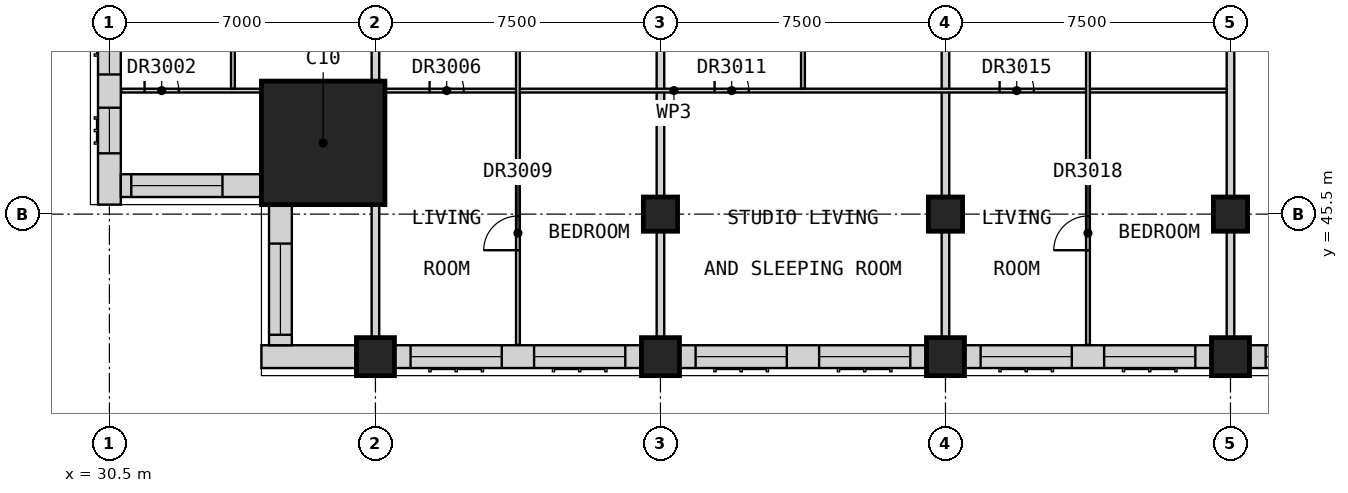
"""IFC4 building model, lengths in metres.
Left out: names, types, materials, properties, quantities, classifications, styles, units other than length and angle.
Written with IfcOpenShell. Run it as: python <this file> out.ifc"""

import sys

from ifc_helpers import new_model, si_unit, direction, frame, frame_2d, origin, origin_2d, place, context, subcontext, project, spatial, rectangle, extrude, element, fill, save


model = new_model("IFC4")
c1 = context("Model", 3, precision=1e-05, world=origin(), true_north=direction((0.0, 1.0)))
c2 = subcontext(c1, "Body", "Model", "MODEL_VIEW")
j1 = project(units=[si_unit("LENGTHUNIT", "METRE"), si_unit("PLANEANGLEUNIT", "RADIAN")], contexts=[c1])
p1 = place(None, origin())
s1 = spatial("IfcSite", under=j1, at=p1, CompositionType="ELEMENT")
p2 = place(p1, origin())
s2 = spatial("IfcBuilding", under=s1, at=p2, CompositionType="ELEMENT")
p3 = place(p2, frame((0.0, 0.0, 186.2)))
s3 = spatial("IfcBuildingStorey", under=s2, at=p3, CompositionType="ELEMENT", Elevation=186.2)
for number, where, z_axis, x_axis in (
    (1, (37.5, 41.75, 0.0), (0.0, 0.0, 1.0), (1.0, 0.0, 0.0)),
    (2, (45.0, 41.75, 0.0), (0.0, 0.0, 1.0), (1.0, 0.0, 0.0)),
    (3, (52.5, 41.75, 0.0), (0.0, 0.0, 1.0), (1.0, 0.0, 0.0)),
    (4, (60.0, 41.75, 0.0), (0.0, 0.0, 1.0), (1.0, 0.0, 0.0)),
):
    element("IfcColumn", number, at=place(p3, frame(where, z_axis=z_axis, x_axis=x_axis)), inside=s3, PredefinedType="COLUMN", context=c2, shape_type="SweptSolid", body=[
        extrude(rectangle(XDim=1.0, YDim=1.0, at=origin_2d()), origin(), (0.0, 0.0, 1.0), 3.5),
    ])
for number, where, z_axis, x_axis in (
    (5, (45.0, 45.5, 0.0), (0.0, 0.0, 1.0), (1.0, 0.0, 0.0)),
    (6, (52.5, 45.5, 0.0), (0.0, 0.0, 1.0), (1.0, 0.0, 0.0)),
    (7, (60.0, 45.5, 0.0), (0.0, 0.0, 1.0), (1.0, 0.0, 0.0)),
):
    element("IfcColumn", number, at=place(p3, frame(where, z_axis=z_axis, x_axis=x_axis)), inside=s3, PredefinedType="COLUMN", context=c2, shape_type="SweptSolid", body=[
        extrude(rectangle(XDim=0.9, YDim=0.9, at=origin_2d()), origin(), (0.0, 0.0, 1.0), 3.5),
    ])
p4 = place(p3, frame((36.125, 47.375, 0.0), z_axis=(0.0, 0.0, 1.0), x_axis=(1.0, 0.0, 0.0)))
e8 = element("IfcColumn", 8, at=p4, inside=s3, PredefinedType="COLUMN", context=c2, shape_type="SweptSolid", body=[
    extrude(rectangle(XDim=3.25, YDim=3.25, at=origin_2d()), origin(), (0.0, 0.0, 1.0), 3.5),
])
p5 = place(p3, frame((34.5, 41.75, 0.0), z_axis=(0.0, 0.0, 1.0), x_axis=(1.0, 0.0, 0.0)))
e9 = element("IfcWall", 9, at=p5, inside=s3, PredefinedType="SOLIDWALL", context=c2, shape_type="SweptSolid", body=[
    extrude(rectangle(XDim=2.5, YDim=0.6, at=frame_2d((1.25, 0.0))), origin(), (0.0, 0.0, 1.0), 3.25),
])
p6 = place(p3, frame((38.0, 41.75, 0.0), z_axis=(0.0, 0.0, 1.0), x_axis=(1.0, 0.0, 0.0)))
e10 = element("IfcWall", 10, at=p6, inside=s3, PredefinedType="SOLIDWALL", context=c2, shape_type="SweptSolid", body=[
    extrude(rectangle(XDim=6.5, YDim=0.6, at=frame_2d((3.25, 0.0))), origin(), (0.0, 0.0, 1.0), 2.75),
])
p7 = place(p6, frame((0.425, 0.0, 0.8)))
e11 = element("IfcOpeningElement", 11, at=p7, cuts=e10, PredefinedType="OPENING", context=c2, shape_type="SweptSolid", body=[
    extrude(rectangle(XDim=2.4, YDim=1.8, at=frame_2d((1.2, 0.9))), frame((0.0, 0.31, 0.0), z_axis=(0.0, -1.0, 0.0), x_axis=(1.0, 0.0, 0.0)), (0.0, 0.0, 1.0), 0.62),
])
p8 = place(p6, frame((3.675, 0.0, 0.8)))
e12 = element("IfcOpeningElement", 12, at=p8, cuts=e10, PredefinedType="OPENING", context=c2, shape_type="SweptSolid", body=[
    extrude(rectangle(XDim=2.4, YDim=1.8, at=frame_2d((1.2, 0.9))), frame((0.0, 0.31, 0.0), z_axis=(0.0, -1.0, 0.0), x_axis=(1.0, 0.0, 0.0)), (0.0, 0.0, 1.0), 0.62),
])
p9 = place(p3, frame((45.5, 41.75, 0.0), z_axis=(0.0, 0.0, 1.0), x_axis=(1.0, 0.0, 0.0)))
e13 = element("IfcWall", 13, at=p9, inside=s3, PredefinedType="SOLIDWALL", context=c2, shape_type="SweptSolid", body=[
    extrude(rectangle(XDim=6.5, YDim=0.6, at=frame_2d((3.25, 0.0))), origin(), (0.0, 0.0, 1.0), 2.75),
])
p10 = place(p9, frame((0.425, 0.0, 0.8)))
e14 = element("IfcOpeningElement", 14, at=p10, cuts=e13, PredefinedType="OPENING", context=c2, shape_type="SweptSolid", body=[
    extrude(rectangle(XDim=2.4, YDim=1.8, at=frame_2d((1.2, 0.9))), frame((0.0, 0.31, 0.0), z_axis=(0.0, -1.0, 0.0), x_axis=(1.0, 0.0, 0.0)), (0.0, 0.0, 1.0), 0.62),
])
p11 = place(p9, frame((3.675, 0.0, 0.8)))
e15 = element("IfcOpeningElement", 15, at=p11, cuts=e13, PredefinedType="OPENING", context=c2, shape_type="SweptSolid", body=[
    extrude(rectangle(XDim=2.4, YDim=1.8, at=frame_2d((1.2, 0.9))), frame((0.0, 0.31, 0.0), z_axis=(0.0, -1.0, 0.0), x_axis=(1.0, 0.0, 0.0)), (0.0, 0.0, 1.0), 0.62),
])
p12 = place(p3, frame((53.0, 41.75, 0.0), z_axis=(0.0, 0.0, 1.0), x_axis=(1.0, 0.0, 0.0)))
e16 = element("IfcWall", 16, at=p12, inside=s3, PredefinedType="SOLIDWALL", context=c2, shape_type="SweptSolid", body=[
    extrude(rectangle(XDim=6.5, YDim=0.6, at=frame_2d((3.25, 0.0))), origin(), (0.0, 0.0, 1.0), 2.75),
])
p13 = place(p12, frame((0.425, 0.0, 0.8)))
e17 = element("IfcOpeningElement", 17, at=p13, cuts=e16, PredefinedType="OPENING", context=c2, shape_type="SweptSolid", body=[
    extrude(rectangle(XDim=2.4, YDim=1.8, at=frame_2d((1.2, 0.9))), frame((0.0, 0.31, 0.0), z_axis=(0.0, -1.0, 0.0), x_axis=(1.0, 0.0, 0.0)), (0.0, 0.0, 1.0), 0.62),
])
p14 = place(p12, frame((3.675, 0.0, 0.8)))
e18 = element("IfcOpeningElement", 18, at=p14, cuts=e16, PredefinedType="OPENING", context=c2, shape_type="SweptSolid", body=[
    extrude(rectangle(XDim=2.4, YDim=1.8, at=frame_2d((1.2, 0.9))), frame((0.0, 0.31, 0.0), z_axis=(0.0, -1.0, 0.0), x_axis=(1.0, 0.0, 0.0)), (0.0, 0.0, 1.0), 0.62),
])
p15 = place(p3, frame((60.5, 41.75, 0.0), z_axis=(0.0, 0.0, 1.0), x_axis=(1.0, 0.0, 0.0)))
e19 = element("IfcWall", 19, at=p15, inside=s3, PredefinedType="SOLIDWALL", context=c2, shape_type="SweptSolid", body=[
    extrude(rectangle(XDim=6.5, YDim=0.6, at=frame_2d((3.25, 0.0))), origin(), (0.0, 0.0, 1.0), 2.75),
])
p16 = place(p15, frame((0.425, 0.0, 0.8)))
e20 = element("IfcOpeningElement", 20, at=p16, cuts=e19, PredefinedType="OPENING", context=c2, shape_type="SweptSolid", body=[
    extrude(rectangle(XDim=2.4, YDim=1.8, at=frame_2d((1.2, 0.9))), frame((0.0, 0.31, 0.0), z_axis=(0.0, -1.0, 0.0), x_axis=(1.0, 0.0, 0.0)), (0.0, 0.0, 1.0), 0.62),
])
p17 = place(p15, frame((3.675, 0.0, 0.8)))
e21 = element("IfcOpeningElement", 21, at=p17, cuts=e19, PredefinedType="OPENING", context=c2, shape_type="SweptSolid", body=[
    extrude(rectangle(XDim=2.4, YDim=1.8, at=frame_2d((1.2, 0.9))), frame((0.0, 0.31, 0.0), z_axis=(0.0, -1.0, 0.0), x_axis=(1.0, 0.0, 0.0)), (0.0, 0.0, 1.0), 0.62),
])
p18 = place(p3, frame((30.5, 52.0, 0.0), z_axis=(0.0, 0.0, 1.0), x_axis=(0.0, -1.0, 0.0)))
e22 = element("IfcWall", 22, at=p18, inside=s3, PredefinedType="SOLIDWALL", context=c2, shape_type="SweptSolid", body=[
    extrude(rectangle(XDim=6.25, YDim=0.6, at=frame_2d((3.125, 0.0))), origin(), (0.0, 0.0, 1.0), 2.75),
])
p19 = place(p18, frame((3.7, 0.0, 0.8)))
e23 = element("IfcOpeningElement", 23, at=p19, cuts=e22, PredefinedType="OPENING", context=c2, shape_type="SweptSolid", body=[
    extrude(rectangle(XDim=1.2, YDim=1.8, at=frame_2d((0.6, 0.9))), frame((0.0, 0.31, 0.0), z_axis=(0.0, -1.0, 0.0), x_axis=(1.0, 0.0, 0.0)), (0.0, 0.0, 1.0), 0.62),
])
p20 = place(p18, frame((0.425, 0.0, 0.8)))
e24 = element("IfcOpeningElement", 24, at=p20, cuts=e22, PredefinedType="OPENING", context=c2, shape_type="SweptSolid", body=[
    extrude(rectangle(XDim=2.4, YDim=1.8, at=frame_2d((1.2, 0.9))), frame((0.0, 0.31, 0.0), z_axis=(0.0, -1.0, 0.0), x_axis=(1.0, 0.0, 0.0)), (0.0, 0.0, 1.0), 0.62),
])
p21 = place(p3, frame((30.8, 46.25, 0.0), z_axis=(0.0, 0.0, 1.0), x_axis=(1.0, 0.0, 0.0)))
e25 = element("IfcWall", 25, at=p21, inside=s3, PredefinedType="SOLIDWALL", context=c2, shape_type="SweptSolid", body=[
    extrude(rectangle(XDim=3.7, YDim=0.6, at=frame_2d((1.85, 0.0))), origin(), (0.0, 0.0, 1.0), 3.25),
])
p22 = place(p21, frame((0.275, 0.0, 0.8)))
e26 = element("IfcOpeningElement", 26, at=p22, cuts=e25, PredefinedType="OPENING", context=c2, shape_type="SweptSolid", body=[
    extrude(rectangle(XDim=2.4, YDim=1.8, at=frame_2d((1.2, 0.9))), frame((0.0, 0.31, 0.0), z_axis=(0.0, -1.0, 0.0), x_axis=(1.0, 0.0, 0.0)), (0.0, 0.0, 1.0), 0.62),
])
p23 = place(p3, frame((35.0, 45.75, 0.0), z_axis=(0.0, 0.0, 1.0), x_axis=(0.0, -1.0, 0.0)))
e27 = element("IfcWall", 27, at=p23, inside=s3, PredefinedType="SOLIDWALL", context=c2, shape_type="SweptSolid", body=[
    extrude(rectangle(XDim=3.7, YDim=0.6, at=frame_2d((1.85, 0.0))), origin(), (0.0, 0.0, 1.0), 3.25),
])
p24 = place(p23, frame((1.025, 0.0, 0.8)))
e28 = element("IfcOpeningElement", 28, at=p24, cuts=e27, PredefinedType="OPENING", context=c2, shape_type="SweptSolid", body=[
    extrude(rectangle(XDim=2.4, YDim=1.8, at=frame_2d((1.2, 0.9))), frame((0.0, 0.31, 0.0), z_axis=(0.0, -1.0, 0.0), x_axis=(1.0, 0.0, 0.0)), (0.0, 0.0, 1.0), 0.62),
])
p25 = place(p3, frame((37.5, 41.25, 0.0), z_axis=(0.0, 0.0, 1.0), x_axis=(0.0, 1.0, 0.0)))
e29 = element("IfcWall", 29, at=p25, inside=s3, PredefinedType="PARTITIONING", context=c2, shape_type="SweptSolid", body=[
    extrude(rectangle(XDim=16.575, YDim=0.2, at=frame_2d((8.288, 0.0))), origin(), (0.0, 0.0, 1.0), 2.75),
])
for number, where, z_axis, x_axis in (
    (30, (45.0, 41.25, 0.0), (0.0, 0.0, 1.0), (0.0, 1.0, 0.0)),
    (31, (52.5, 41.25, 0.0), (0.0, 0.0, 1.0), (0.0, 1.0, 0.0)),
    (32, (60.0, 41.25, 0.0), (0.0, 0.0, 1.0), (0.0, 1.0, 0.0)),
):
    element("IfcWall", number, at=place(p3, frame(where, z_axis=z_axis, x_axis=x_axis)), inside=s3, PredefinedType="PARTITIONING", context=c2, shape_type="SweptSolid", body=[
        extrude(rectangle(XDim=16.575, YDim=0.2, at=frame_2d((8.288, 0.0))), origin(), (0.0, 0.0, 1.0), 3.25),
    ])
p26 = place(p3, frame((30.81, 48.75, 0.0), z_axis=(0.0, 0.0, 1.0), x_axis=(1.0, 0.0, 0.0)))
e33 = element("IfcWall", 33, at=p26, inside=s3, PredefinedType="PARTITIONING", context=c2, shape_type="SweptSolid", body=[
    extrude(rectangle(XDim=29.09, YDim=0.1, at=frame_2d((14.545, 0.0))), origin(), (0.0, 0.0, 1.0), 3.25),
])
p27 = place(p26, frame((0.615, 0.0, 0.0)))
e34 = element("IfcOpeningElement", 34, at=p27, cuts=e33, PredefinedType="OPENING", context=c2, shape_type="SweptSolid", body=[
    extrude(rectangle(XDim=0.9, YDim=2.1, at=frame_2d((0.45, 1.05))), frame((0.0, 0.06, 0.0), z_axis=(0.0, -1.0, 0.0), x_axis=(1.0, 0.0, 0.0)), (0.0, 0.0, 1.0), 0.12),
])
p28 = place(p26, frame((8.115, 0.0, 0.0)))
e35 = element("IfcOpeningElement", 35, at=p28, cuts=e33, PredefinedType="OPENING", context=c2, shape_type="SweptSolid", body=[
    extrude(rectangle(XDim=0.9, YDim=2.1, at=frame_2d((0.45, 1.05))), frame((0.0, 0.06, 0.0), z_axis=(0.0, -1.0, 0.0), x_axis=(1.0, 0.0, 0.0)), (0.0, 0.0, 1.0), 0.12),
])
p29 = place(p26, frame((15.615, 0.0, 0.0)))
e36 = element("IfcOpeningElement", 36, at=p29, cuts=e33, PredefinedType="OPENING", context=c2, shape_type="SweptSolid", body=[
    extrude(rectangle(XDim=0.9, YDim=2.1, at=frame_2d((0.45, 1.05))), frame((0.0, 0.06, 0.0), z_axis=(0.0, -1.0, 0.0), x_axis=(1.0, 0.0, 0.0)), (0.0, 0.0, 1.0), 0.12),
])
p30 = place(p26, frame((23.115, 0.0, 0.0)))
e37 = element("IfcOpeningElement", 37, at=p30, cuts=e33, PredefinedType="OPENING", context=c2, shape_type="SweptSolid", body=[
    extrude(rectangle(XDim=0.9, YDim=2.1, at=frame_2d((0.45, 1.05))), frame((0.0, 0.06, 0.0), z_axis=(0.0, -1.0, 0.0), x_axis=(1.0, 0.0, 0.0)), (0.0, 0.0, 1.0), 0.12),
])
p31 = place(p3, frame((33.75, 48.8, 0.0), z_axis=(0.0, 0.0, 1.0), x_axis=(0.0, 1.0, 0.0)))
e38 = element("IfcWall", 38, at=p31, inside=s3, PredefinedType="PARTITIONING", context=c2, shape_type="SweptSolid", body=[
    extrude(rectangle(XDim=4.462, YDim=0.1, at=frame_2d((2.231, 0.0))), origin(), (0.0, 0.0, 1.0), 3.25),
])
p32 = place(p31, frame((1.788, 0.0, 0.0)))
e39 = element("IfcOpeningElement", 39, at=p32, cuts=e38, PredefinedType="OPENING", context=c2, shape_type="SweptSolid", body=[
    extrude(rectangle(XDim=0.9, YDim=2.1, at=frame_2d((0.45, 1.05))), frame((0.0, 0.06, 0.0), z_axis=(0.0, -1.0, 0.0), x_axis=(1.0, 0.0, 0.0)), (0.0, 0.0, 1.0), 0.12),
])
p33 = place(p3, frame((41.25, 42.06, 0.0), z_axis=(0.0, 0.0, 1.0), x_axis=(0.0, 1.0, 0.0)))
e40 = element("IfcWall", 40, at=p33, inside=s3, PredefinedType="PARTITIONING", context=c2, shape_type="SweptSolid", body=[
    extrude(rectangle(XDim=11.202, YDim=0.1, at=frame_2d((5.601, 0.0))), origin(), (0.0, 0.0, 1.0), 3.25),
])
p34 = place(p33, frame((8.528, 0.0, 0.0)))
e41 = element("IfcOpeningElement", 41, at=p34, cuts=e40, PredefinedType="OPENING", context=c2, shape_type="SweptSolid", body=[
    extrude(rectangle(XDim=0.9, YDim=2.1, at=frame_2d((0.45, 1.05))), frame((0.0, 0.06, 0.0), z_axis=(0.0, -1.0, 0.0), x_axis=(1.0, 0.0, 0.0)), (0.0, 0.0, 1.0), 0.12),
])
p35 = place(p33, frame((2.49, 0.0, 0.0)))
e42 = element("IfcOpeningElement", 42, at=p35, cuts=e40, PredefinedType="OPENING", context=c2, shape_type="SweptSolid", body=[
    extrude(rectangle(XDim=0.9, YDim=2.1, at=frame_2d((0.45, 1.05))), frame((0.0, 0.06, 0.0), z_axis=(0.0, -1.0, 0.0), x_axis=(1.0, 0.0, 0.0)), (0.0, 0.0, 1.0), 0.12),
])
p36 = place(p3, frame((48.75, 48.8, 0.0), z_axis=(0.0, 0.0, 1.0), x_axis=(0.0, 1.0, 0.0)))
e43 = element("IfcWall", 43, at=p36, inside=s3, PredefinedType="PARTITIONING", context=c2, shape_type="SweptSolid", body=[
    extrude(rectangle(XDim=4.462, YDim=0.1, at=frame_2d((2.231, 0.0))), origin(), (0.0, 0.0, 1.0), 3.25),
])
p37 = place(p36, frame((1.788, 0.0, 0.0)))
e44 = element("IfcOpeningElement", 44, at=p37, cuts=e43, PredefinedType="OPENING", context=c2, shape_type="SweptSolid", body=[
    extrude(rectangle(XDim=0.9, YDim=2.1, at=frame_2d((0.45, 1.05))), frame((0.0, 0.06, 0.0), z_axis=(0.0, -1.0, 0.0), x_axis=(1.0, 0.0, 0.0)), (0.0, 0.0, 1.0), 0.12),
])
p38 = place(p3, frame((56.25, 42.06, 0.0), z_axis=(0.0, 0.0, 1.0), x_axis=(0.0, 1.0, 0.0)))
e45 = element("IfcWall", 45, at=p38, inside=s3, PredefinedType="PARTITIONING", context=c2, shape_type="SweptSolid", body=[
    extrude(rectangle(XDim=11.202, YDim=0.1, at=frame_2d((5.601, 0.0))), origin(), (0.0, 0.0, 1.0), 3.25),
])
p39 = place(p38, frame((8.528, 0.0, 0.0)))
e46 = element("IfcOpeningElement", 46, at=p39, cuts=e45, PredefinedType="OPENING", context=c2, shape_type="SweptSolid", body=[
    extrude(rectangle(XDim=0.9, YDim=2.1, at=frame_2d((0.45, 1.05))), frame((0.0, 0.06, 0.0), z_axis=(0.0, -1.0, 0.0), x_axis=(1.0, 0.0, 0.0)), (0.0, 0.0, 1.0), 0.12),
])
p40 = place(p38, frame((2.49, 0.0, 0.0)))
e47 = element("IfcOpeningElement", 47, at=p40, cuts=e45, PredefinedType="OPENING", context=c2, shape_type="SweptSolid", body=[
    extrude(rectangle(XDim=0.9, YDim=2.1, at=frame_2d((0.45, 1.05))), frame((0.0, 0.06, 0.0), z_axis=(0.0, -1.0, 0.0), x_axis=(1.0, 0.0, 0.0)), (0.0, 0.0, 1.0), 0.12),
])
p41 = place(p7, origin())
e48 = element("IfcWindow", 48, at=p41, inside=s3, PartitioningType="SINGLE_PANEL", PredefinedType="WINDOW", context=c2, shape_type="SweptSolid", body=[
    extrude(rectangle(XDim=2.4, YDim=1.8, at=frame_2d((1.2, 0.9))), frame((0.0, -0.07, 0.0), z_axis=(0.0, -1.0, 0.0), x_axis=(1.0, 0.0, 0.0)), (0.0, 0.0, 1.0), 0.06),
])
fill(e11, e48)
p42 = place(p8, origin())
e49 = element("IfcWindow", 49, at=p42, inside=s3, PartitioningType="SINGLE_PANEL", PredefinedType="WINDOW", context=c2, shape_type="SweptSolid", body=[
    extrude(rectangle(XDim=2.4, YDim=1.8, at=frame_2d((1.2, 0.9))), frame((0.0, -0.07, 0.0), z_axis=(0.0, -1.0, 0.0), x_axis=(1.0, 0.0, 0.0)), (0.0, 0.0, 1.0), 0.06),
])
fill(e12, e49)
p43 = place(p10, origin())
e50 = element("IfcWindow", 50, at=p43, inside=s3, PartitioningType="SINGLE_PANEL", PredefinedType="WINDOW", context=c2, shape_type="SweptSolid", body=[
    extrude(rectangle(XDim=2.4, YDim=1.8, at=frame_2d((1.2, 0.9))), frame((0.0, -0.07, 0.0), z_axis=(0.0, -1.0, 0.0), x_axis=(1.0, 0.0, 0.0)), (0.0, 0.0, 1.0), 0.06),
])
fill(e14, e50)
p44 = place(p11, origin())
e51 = element("IfcWindow", 51, at=p44, inside=s3, PartitioningType="SINGLE_PANEL", PredefinedType="WINDOW", context=c2, shape_type="SweptSolid", body=[
    extrude(rectangle(XDim=2.4, YDim=1.8, at=frame_2d((1.2, 0.9))), frame((0.0, -0.07, 0.0), z_axis=(0.0, -1.0, 0.0), x_axis=(1.0, 0.0, 0.0)), (0.0, 0.0, 1.0), 0.06),
])
fill(e15, e51)
p45 = place(p13, origin())
e52 = element("IfcWindow", 52, at=p45, inside=s3, PartitioningType="SINGLE_PANEL", PredefinedType="WINDOW", context=c2, shape_type="SweptSolid", body=[
    extrude(rectangle(XDim=2.4, YDim=1.8, at=frame_2d((1.2, 0.9))), frame((0.0, -0.07, 0.0), z_axis=(0.0, -1.0, 0.0), x_axis=(1.0, 0.0, 0.0)), (0.0, 0.0, 1.0), 0.06),
])
fill(e17, e52)
p46 = place(p14, origin())
e53 = element("IfcWindow", 53, at=p46, inside=s3, PartitioningType="SINGLE_PANEL", PredefinedType="WINDOW", context=c2, shape_type="SweptSolid", body=[
    extrude(rectangle(XDim=2.4, YDim=1.8, at=frame_2d((1.2, 0.9))), frame((0.0, -0.07, 0.0), z_axis=(0.0, -1.0, 0.0), x_axis=(1.0, 0.0, 0.0)), (0.0, 0.0, 1.0), 0.06),
])
fill(e18, e53)
p47 = place(p16, origin())
e54 = element("IfcWindow", 54, at=p47, inside=s3, PartitioningType="SINGLE_PANEL", PredefinedType="WINDOW", context=c2, shape_type="SweptSolid", body=[
    extrude(rectangle(XDim=2.4, YDim=1.8, at=frame_2d((1.2, 0.9))), frame((0.0, -0.07, 0.0), z_axis=(0.0, -1.0, 0.0), x_axis=(1.0, 0.0, 0.0)), (0.0, 0.0, 1.0), 0.06),
])
fill(e20, e54)
p48 = place(p19, origin())
e55 = element("IfcWindow", 55, at=p48, inside=s3, PartitioningType="SINGLE_PANEL", PredefinedType="WINDOW", context=c2, shape_type="SweptSolid", body=[
    extrude(rectangle(XDim=1.2, YDim=1.8, at=frame_2d((0.6, 0.9))), frame((0.0, -0.07, 0.0), z_axis=(0.0, -1.0, 0.0), x_axis=(1.0, 0.0, 0.0)), (0.0, 0.0, 1.0), 0.06),
])
fill(e23, e55)
p49 = place(p20, origin())
e56 = element("IfcWindow", 56, at=p49, inside=s3, PartitioningType="SINGLE_PANEL", PredefinedType="WINDOW", context=c2, shape_type="SweptSolid", body=[
    extrude(rectangle(XDim=2.4, YDim=1.8, at=frame_2d((1.2, 0.9))), frame((0.0, -0.07, 0.0), z_axis=(0.0, -1.0, 0.0), x_axis=(1.0, 0.0, 0.0)), (0.0, 0.0, 1.0), 0.06),
])
fill(e24, e56)
p50 = place(p22, origin())
e57 = element("IfcWindow", 57, at=p50, inside=s3, PartitioningType="SINGLE_PANEL", PredefinedType="WINDOW", context=c2, shape_type="SweptSolid", body=[
    extrude(rectangle(XDim=2.4, YDim=1.8, at=frame_2d((1.2, 0.9))), frame((0.0, -0.07, 0.0), z_axis=(0.0, -1.0, 0.0), x_axis=(1.0, 0.0, 0.0)), (0.0, 0.0, 1.0), 0.06),
])
fill(e26, e57)
p51 = place(p24, origin())
e58 = element("IfcWindow", 58, at=p51, inside=s3, PartitioningType="SINGLE_PANEL", PredefinedType="WINDOW", context=c2, shape_type="SweptSolid", body=[
    extrude(rectangle(XDim=2.4, YDim=1.8, at=frame_2d((1.2, 0.9))), frame((0.0, -0.07, 0.0), z_axis=(0.0, -1.0, 0.0), x_axis=(1.0, 0.0, 0.0)), (0.0, 0.0, 1.0), 0.06),
])
fill(e28, e58)
p52 = place(p27, origin())
e59 = element("IfcDoor", 59, at=p52, inside=s3, OperationType="SINGLE_SWING_LEFT", PredefinedType="DOOR", context=c2, shape_type="SweptSolid", body=[
    extrude(rectangle(XDim=0.9, YDim=2.1, at=frame_2d((0.45, 1.05))), frame((0.0, 0.025, 0.0), z_axis=(0.0, -1.0, 0.0), x_axis=(1.0, 0.0, 0.0)), (0.0, 0.0, 1.0), 0.05),
])
fill(e34, e59)
p53 = place(p28, origin())
e60 = element("IfcDoor", 60, at=p53, inside=s3, OperationType="SINGLE_SWING_LEFT", PredefinedType="DOOR", context=c2, shape_type="SweptSolid", body=[
    extrude(rectangle(XDim=0.9, YDim=2.1, at=frame_2d((0.45, 1.05))), frame((0.0, 0.025, 0.0), z_axis=(0.0, -1.0, 0.0), x_axis=(1.0, 0.0, 0.0)), (0.0, 0.0, 1.0), 0.05),
])
fill(e35, e60)
p54 = place(p35, origin())
e61 = element("IfcDoor", 61, at=p54, inside=s3, OperationType="SINGLE_SWING_LEFT", PredefinedType="DOOR", context=c2, shape_type="SweptSolid", body=[
    extrude(rectangle(XDim=0.9, YDim=2.1, at=frame_2d((0.45, 1.05))), frame((0.0, 0.025, 0.0), z_axis=(0.0, -1.0, 0.0), x_axis=(1.0, 0.0, 0.0)), (0.0, 0.0, 1.0), 0.05),
])
fill(e42, e61)
p55 = place(p29, origin())
e62 = element("IfcDoor", 62, at=p55, inside=s3, OperationType="SINGLE_SWING_LEFT", PredefinedType="DOOR", context=c2, shape_type="SweptSolid", body=[
    extrude(rectangle(XDim=0.9, YDim=2.1, at=frame_2d((0.45, 1.05))), frame((0.0, 0.025, 0.0), z_axis=(0.0, -1.0, 0.0), x_axis=(1.0, 0.0, 0.0)), (0.0, 0.0, 1.0), 0.05),
])
fill(e36, e62)
p56 = place(p30, origin())
e63 = element("IfcDoor", 63, at=p56, inside=s3, OperationType="SINGLE_SWING_LEFT", PredefinedType="DOOR", context=c2, shape_type="SweptSolid", body=[
    extrude(rectangle(XDim=0.9, YDim=2.1, at=frame_2d((0.45, 1.05))), frame((0.0, 0.025, 0.0), z_axis=(0.0, -1.0, 0.0), x_axis=(1.0, 0.0, 0.0)), (0.0, 0.0, 1.0), 0.05),
])
fill(e37, e63)
p57 = place(p40, origin())
e64 = element("IfcDoor", 64, at=p57, inside=s3, OperationType="SINGLE_SWING_LEFT", PredefinedType="DOOR", context=c2, shape_type="SweptSolid", body=[
    extrude(rectangle(XDim=0.9, YDim=2.1, at=frame_2d((0.45, 1.05))), frame((0.0, 0.025, 0.0), z_axis=(0.0, -1.0, 0.0), x_axis=(1.0, 0.0, 0.0)), (0.0, 0.0, 1.0), 0.05),
])
fill(e47, e64)
save(model, sys.argv[1])
